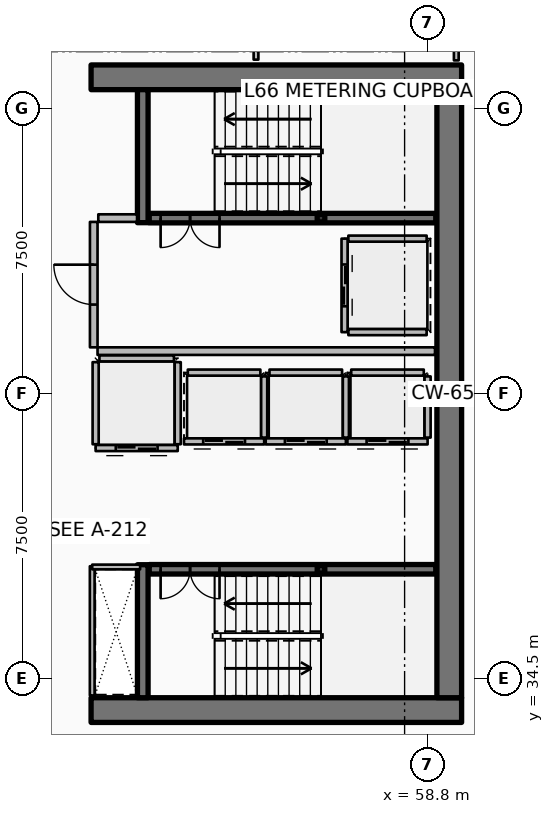
"""IFC4 building model, lengths in metres.
Left out: names, types, materials, properties, quantities, classifications, styles, units other than length and angle.
Written with IfcOpenShell. Run it as: python <this file> out.ifc"""

import sys

from ifc_helpers import new_model, si_unit, direction, frame, frame_2d, origin, origin_2d, place, context, subcontext, project, spatial, rectangle, hollow_rectangle, extrude, element, fill, save


model = new_model("IFC4")
c1 = context("Model", 3, precision=1e-05, world=origin(), true_north=direction((0.0, 1.0)))
c2 = subcontext(c1, "Body", "Model", "MODEL_VIEW")
j1 = project(units=[si_unit("LENGTHUNIT", "METRE"), si_unit("PLANEANGLEUNIT", "RADIAN")], contexts=[c1])
p1 = place(None, origin())
s1 = spatial("IfcSite", under=j1, at=p1, CompositionType="ELEMENT")
p2 = place(p1, origin())
s2 = spatial("IfcBuilding", under=s1, at=p2, CompositionType="ELEMENT")
p3 = place(p2, frame((0.0, 0.0, 263.65)))
s3 = spatial("IfcBuildingStorey", under=s2, at=p3, CompositionType="ELEMENT", Elevation=263.65)
for number, where, z_axis, x_axis in (
    (1, (49.95, 33.675, 0.0), (0.0, 0.0, 1.0), (1.0, 0.0, 0.0)),
    (2, (49.95, 50.325, 0.0), (0.0, 0.0, 1.0), (1.0, 0.0, 0.0)),
):
    element("IfcWall", number, at=place(p3, frame(where, z_axis=z_axis, x_axis=x_axis)), inside=s3, PredefinedType="SHEAR", context=c2, shape_type="SweptSolid", body=[
        extrude(rectangle(XDim=9.75, YDim=0.65, at=frame_2d((4.875, 0.0))), origin(), (0.0, 0.0, 1.0), 3.85),
    ])
p4 = place(p3, frame((59.375, 34.0, 0.0), z_axis=(0.0, 0.0, 1.0), x_axis=(0.0, 1.0, 0.0)))
e3 = element("IfcWall", 3, at=p4, inside=s3, PredefinedType="SHEAR", context=c2, shape_type="SweptSolid", body=[
    extrude(rectangle(XDim=16.0, YDim=0.65, at=frame_2d((8.0, 0.0))), origin(), (0.0, 0.0, 1.0), 3.85),
])
for number, where, z_axis, x_axis in (
    (4, (51.31, 46.5, 0.0), (0.0, 0.0, 1.0), (0.0, 1.0, 0.0)),
    (5, (51.31, 34.0, 0.0), (0.0, 0.0, 1.0), (0.0, 1.0, 0.0)),
):
    element("IfcWall", number, at=place(p3, frame(where, z_axis=z_axis, x_axis=x_axis)), inside=s3, PredefinedType="SHEAR", context=c2, shape_type="SweptSolid", body=[
        extrude(rectangle(XDim=3.5, YDim=0.28, at=frame_2d((1.75, 0.0))), origin(), (0.0, 0.0, 1.0), 3.85),
    ])
for number, where, z_axis, x_axis in (
    (6, (56.0, 46.62, 0.0), (0.0, 0.0, 1.0), (1.0, 0.0, 0.0)),
    (7, (56.0, 37.38, 0.0), (0.0, 0.0, 1.0), (1.0, 0.0, 0.0)),
):
    element("IfcColumn", number, at=place(p3, frame(where, z_axis=z_axis, x_axis=x_axis)), inside=s3, PredefinedType="COLUMN", context=c2, shape_type="SweptSolid", body=[
        extrude(hollow_rectangle(XDim=0.2, YDim=0.2, WallThickness=0.01, InnerFilletRadius=0.01, OuterFilletRadius=0.02, at=origin_2d()), origin(), (0.0, 0.0, 1.0), 1.72),
    ])
p5 = place(p3, frame((51.48, 46.62, 0.0), z_axis=(0.0, 0.0, 1.0), x_axis=(1.0, 0.0, 0.0)))
e8 = element("IfcWall", 8, at=p5, inside=s3, PredefinedType="SOLIDWALL", context=c2, shape_type="SweptSolid", body=[
    extrude(rectangle(XDim=7.54, YDim=0.25, at=frame_2d((3.77, 0.0))), origin(), (0.0, 0.0, 1.0), 3.59),
])
p6 = place(p5, frame((0.3, 0.0, 0.0)))
e9 = element("IfcOpeningElement", 9, at=p6, cuts=e8, PredefinedType="OPENING", context=c2, shape_type="SweptSolid", body=[
    extrude(rectangle(XDim=1.55, YDim=2.15, at=frame_2d((0.775, 1.075))), frame((0.0, 0.135, 0.0), z_axis=(0.0, -1.0, 0.0), x_axis=(1.0, 0.0, 0.0)), (0.0, 0.0, 1.0), 0.27),
])
p7 = place(p3, frame((51.48, 37.38, 0.0), z_axis=(0.0, 0.0, 1.0), x_axis=(1.0, 0.0, 0.0)))
e10 = element("IfcWall", 10, at=p7, inside=s3, PredefinedType="SOLIDWALL", context=c2, shape_type="SweptSolid", body=[
    extrude(rectangle(XDim=7.54, YDim=0.25, at=frame_2d((3.77, 0.0))), origin(), (0.0, 0.0, 1.0), 3.59),
])
p8 = place(p7, frame((0.3, 0.0, 0.0)))
e11 = element("IfcOpeningElement", 11, at=p8, cuts=e10, PredefinedType="OPENING", context=c2, shape_type="SweptSolid", body=[
    extrude(rectangle(XDim=1.55, YDim=2.15, at=frame_2d((0.775, 1.075))), frame((0.0, 0.135, 0.0), z_axis=(0.0, -1.0, 0.0), x_axis=(1.0, 0.0, 0.0)), (0.0, 0.0, 1.0), 0.27),
])
p9 = place(p3, frame((54.505, 40.745, 0.0), z_axis=(0.0, 0.0, 1.0), x_axis=(-1.0, 0.0, 0.0)))
e12 = element("IfcWall", 12, at=p9, inside=s3, PredefinedType="PARTITIONING", context=c2, shape_type="SweptSolid", body=[
    extrude(rectangle(XDim=2.11, YDim=0.16, at=frame_2d((1.055, 0.0))), origin(), (0.0, 0.0, 1.0), 3.59),
])
p10 = place(p9, frame((0.505, 0.0, 0.0)))
e13 = element("IfcOpeningElement", 13, at=p10, cuts=e12, PredefinedType="OPENING", context=c2, shape_type="SweptSolid", body=[
    extrude(rectangle(XDim=1.1, YDim=2.1, at=frame_2d((0.55, 1.05))), frame((0.0, 0.09, 0.0), z_axis=(0.0, -1.0, 0.0), x_axis=(1.0, 0.0, 0.0)), (0.0, 0.0, 1.0), 0.18),
])
p11 = place(p3, frame((54.505, 40.845, 0.0), z_axis=(0.0, 0.0, 1.0), x_axis=(0.0, 1.0, 0.0)))
e14 = element("IfcWall", 14, at=p11, inside=s3, PredefinedType="PARTITIONING", context=c2, shape_type="SweptSolid", body=[
    extrude(rectangle(XDim=1.61, YDim=0.16, at=frame_2d((0.805, 0.0))), origin(), (0.0, 0.0, 1.0), 3.59),
])
p12 = place(p3, frame((52.495, 42.555, 0.0), z_axis=(0.0, 0.0, 1.0), x_axis=(1.0, 0.0, 0.0)))
e15 = element("IfcWall", 15, at=p12, inside=s3, PredefinedType="PARTITIONING", context=c2, shape_type="SweptSolid", body=[
    extrude(rectangle(XDim=1.91, YDim=0.16, at=frame_2d((0.955, 0.0))), origin(), (0.0, 0.0, 1.0), 3.59),
])
p13 = place(p3, frame((56.655, 40.745, 0.0), z_axis=(0.0, 0.0, 1.0), x_axis=(-1.0, 0.0, 0.0)))
e16 = element("IfcWall", 16, at=p13, inside=s3, PredefinedType="PARTITIONING", context=c2, shape_type="SweptSolid", body=[
    extrude(rectangle(XDim=2.11, YDim=0.16, at=frame_2d((1.055, 0.0))), origin(), (0.0, 0.0, 1.0), 3.59),
])
p14 = place(p13, frame((0.505, 0.0, 0.0)))
e17 = element("IfcOpeningElement", 17, at=p14, cuts=e16, PredefinedType="OPENING", context=c2, shape_type="SweptSolid", body=[
    extrude(rectangle(XDim=1.1, YDim=2.1, at=frame_2d((0.55, 1.05))), frame((0.0, 0.09, 0.0), z_axis=(0.0, -1.0, 0.0), x_axis=(1.0, 0.0, 0.0)), (0.0, 0.0, 1.0), 0.18),
])
p15 = place(p3, frame((56.655, 40.845, 0.0), z_axis=(0.0, 0.0, 1.0), x_axis=(0.0, 1.0, 0.0)))
e18 = element("IfcWall", 18, at=p15, inside=s3, PredefinedType="PARTITIONING", context=c2, shape_type="SweptSolid", body=[
    extrude(rectangle(XDim=1.61, YDim=0.16, at=frame_2d((0.805, 0.0))), origin(), (0.0, 0.0, 1.0), 3.59),
])
p16 = place(p3, frame((54.645, 42.555, 0.0), z_axis=(0.0, 0.0, 1.0), x_axis=(1.0, 0.0, 0.0)))
e19 = element("IfcWall", 19, at=p16, inside=s3, PredefinedType="PARTITIONING", context=c2, shape_type="SweptSolid", body=[
    extrude(rectangle(XDim=1.91, YDim=0.16, at=frame_2d((0.955, 0.0))), origin(), (0.0, 0.0, 1.0), 3.59),
])
p17 = place(p3, frame((58.805, 40.745, 0.0), z_axis=(0.0, 0.0, 1.0), x_axis=(-1.0, 0.0, 0.0)))
e20 = element("IfcWall", 20, at=p17, inside=s3, PredefinedType="PARTITIONING", context=c2, shape_type="SweptSolid", body=[
    extrude(rectangle(XDim=2.11, YDim=0.16, at=frame_2d((1.055, 0.0))), origin(), (0.0, 0.0, 1.0), 3.59),
])
p18 = place(p17, frame((0.505, 0.0, 0.0)))
e21 = element("IfcOpeningElement", 21, at=p18, cuts=e20, PredefinedType="OPENING", context=c2, shape_type="SweptSolid", body=[
    extrude(rectangle(XDim=1.1, YDim=2.1, at=frame_2d((0.55, 1.05))), frame((0.0, 0.09, 0.0), z_axis=(0.0, -1.0, 0.0), x_axis=(1.0, 0.0, 0.0)), (0.0, 0.0, 1.0), 0.18),
])
p19 = place(p3, frame((58.805, 40.845, 0.0), z_axis=(0.0, 0.0, 1.0), x_axis=(0.0, 1.0, 0.0)))
e22 = element("IfcWall", 22, at=p19, inside=s3, PredefinedType="PARTITIONING", context=c2, shape_type="SweptSolid", body=[
    extrude(rectangle(XDim=1.61, YDim=0.16, at=frame_2d((0.805, 0.0))), origin(), (0.0, 0.0, 1.0), 3.59),
])
p20 = place(p3, frame((56.795, 42.555, 0.0), z_axis=(0.0, 0.0, 1.0), x_axis=(1.0, 0.0, 0.0)))
e23 = element("IfcWall", 23, at=p20, inside=s3, PredefinedType="PARTITIONING", context=c2, shape_type="SweptSolid", body=[
    extrude(rectangle(XDim=1.91, YDim=0.16, at=frame_2d((0.955, 0.0))), origin(), (0.0, 0.0, 1.0), 3.59),
])
p21 = place(p3, frame((56.62, 46.08, 0.0), z_axis=(0.0, 0.0, 1.0), x_axis=(0.0, -1.0, 0.0)))
e24 = element("IfcWall", 24, at=p21, inside=s3, PredefinedType="PARTITIONING", context=c2, shape_type="SweptSolid", body=[
    extrude(rectangle(XDim=2.46, YDim=0.16, at=frame_2d((1.23, 0.0))), origin(), (0.0, 0.0, 1.0), 3.59),
])
p22 = place(p21, frame((0.68, 0.0, 0.0)))
e25 = element("IfcOpeningElement", 25, at=p22, cuts=e24, PredefinedType="OPENING", context=c2, shape_type="SweptSolid", body=[
    extrude(rectangle(XDim=1.1, YDim=2.1, at=frame_2d((0.55, 1.05))), frame((0.0, 0.09, 0.0), z_axis=(0.0, -1.0, 0.0), x_axis=(1.0, 0.0, 0.0)), (0.0, 0.0, 1.0), 0.18),
])
for number, where, z_axis, x_axis in (
    (26, (56.72, 46.08, 0.0), (0.0, 0.0, 1.0), (1.0, 0.0, 0.0)),
    (27, (56.72, 43.62, 0.0), (0.0, 0.0, 1.0), (1.0, 0.0, 0.0)),
):
    element("IfcWall", number, at=place(p3, frame(where, z_axis=z_axis, x_axis=x_axis)), inside=s3, PredefinedType="PARTITIONING", context=c2, shape_type="SweptSolid", body=[
        extrude(rectangle(XDim=2.06, YDim=0.16, at=frame_2d((1.03, 0.0))), origin(), (0.0, 0.0, 1.0), 3.59),
    ])
p23 = place(p3, frame((52.23, 40.57, 0.0), z_axis=(0.0, 0.0, 1.0), x_axis=(-1.0, 0.0, 0.0)))
e28 = element("IfcWall", 28, at=p23, inside=s3, PredefinedType="PARTITIONING", context=c2, shape_type="SweptSolid", body=[
    extrude(rectangle(XDim=2.16, YDim=0.16, at=frame_2d((1.08, 0.0))), origin(), (0.0, 0.0, 1.0), 3.59),
])
p24 = place(p23, frame((0.53, 0.0, 0.0)))
e29 = element("IfcOpeningElement", 29, at=p24, cuts=e28, PredefinedType="OPENING", context=c2, shape_type="SweptSolid", body=[
    extrude(rectangle(XDim=1.1, YDim=2.1, at=frame_2d((0.55, 1.05))), frame((0.0, 0.09, 0.0), z_axis=(0.0, -1.0, 0.0), x_axis=(1.0, 0.0, 0.0)), (0.0, 0.0, 1.0), 0.18),
])
for number, where, z_axis, x_axis in (
    (30, (52.23, 40.67, 0.0), (0.0, 0.0, 1.0), (0.0, 1.0, 0.0)),
    (31, (50.07, 40.67, 0.0), (0.0, 0.0, 1.0), (0.0, 1.0, 0.0)),
):
    element("IfcWall", number, at=place(p3, frame(where, z_axis=z_axis, x_axis=x_axis)), inside=s3, PredefinedType="PARTITIONING", context=c2, shape_type="SweptSolid", body=[
        extrude(rectangle(XDim=2.16, YDim=0.16, at=frame_2d((1.08, 0.0))), origin(), (0.0, 0.0, 1.0), 3.59),
    ])
p25 = place(p3, frame((50.17, 42.93, 0.0), z_axis=(0.0, 0.0, 1.0), x_axis=(1.0, 0.0, 0.0)))
e32 = element("IfcWall", 32, at=p25, inside=s3, PredefinedType="PARTITIONING", context=c2, shape_type="SweptSolid", body=[
    extrude(rectangle(XDim=1.96, YDim=0.16, at=frame_2d((0.98, 0.0))), origin(), (0.0, 0.0, 1.0), 3.59),
])
p26 = place(p3, frame((50.12, 43.12, 0.0), z_axis=(0.0, 0.0, 1.0), x_axis=(1.0, 0.0, 0.0)))
e33 = element("IfcWall", 33, at=p26, inside=s3, PredefinedType="PARTITIONING", context=c2, shape_type="SweptSolid", body=[
    extrude(rectangle(XDim=8.88, YDim=0.2, at=frame_2d((4.44, 0.0))), origin(), (0.0, 0.0, 1.0), 3.59),
])
p27 = place(p3, frame((50.14, 46.62, 0.0), z_axis=(0.0, 0.0, 1.0), x_axis=(1.0, 0.0, 0.0)))
e34 = element("IfcWall", 34, at=p27, inside=s3, PredefinedType="PARTITIONING", context=c2, shape_type="SweptSolid", body=[
    extrude(rectangle(XDim=1.02, YDim=0.2, at=frame_2d((0.51, 0.0))), origin(), (0.0, 0.0, 1.0), 3.59),
])
p28 = place(p3, frame((50.02, 43.22, 0.0), z_axis=(0.0, 0.0, 1.0), x_axis=(0.0, 1.0, 0.0)))
e35 = element("IfcWall", 35, at=p28, inside=s3, PredefinedType="PARTITIONING", context=c2, shape_type="SweptSolid", body=[
    extrude(rectangle(XDim=3.3, YDim=0.2, at=frame_2d((1.65, 0.0))), origin(), (0.0, 0.0, 1.0), 3.59),
])
p29 = place(p28, frame((1.125, 0.0, 0.0)))
e36 = element("IfcOpeningElement", 36, at=p29, cuts=e35, PredefinedType="OPENING", context=c2, shape_type="SweptSolid", body=[
    extrude(rectangle(XDim=1.05, YDim=2.1, at=frame_2d((0.525, 1.05))), frame((0.0, 0.11, 0.0), z_axis=(0.0, -1.0, 0.0), x_axis=(1.0, 0.0, 0.0)), (0.0, 0.0, 1.0), 0.22),
])
p30 = place(p3, frame((49.98, 34.06, 0.0), z_axis=(0.0, 0.0, 1.0), x_axis=(0.0, 1.0, 0.0)))
e37 = element("IfcWall", 37, at=p30, inside=s3, PredefinedType="PARTITIONING", context=c2, shape_type="SweptSolid", body=[
    extrude(rectangle(XDim=3.4, YDim=0.125, at=frame_2d((1.7, 0.0))), origin(), (0.0, 0.0, 1.0), 3.03),
])
p31 = place(p3, frame((49.98, 37.44, 0.0), z_axis=(0.0, 0.0, 1.0), x_axis=(1.0, 0.0, 0.0)))
e38 = element("IfcWall", 38, at=p31, inside=s3, PredefinedType="PARTITIONING", context=c2, shape_type="SweptSolid", body=[
    extrude(rectangle(XDim=1.26, YDim=0.125, at=frame_2d((0.63, 0.0))), origin(), (0.0, 0.0, 1.0), 3.03),
])
p32 = place(p3, frame((59.56, 50.77, 0.0), z_axis=(0.0, 0.0, 1.0), x_axis=(0.0, 1.0, 0.0)))
e39 = element("IfcWall", 39, at=p32, inside=s3, PredefinedType="PARTITIONING", context=c2, shape_type="SweptSolid", body=[
    extrude(rectangle(XDim=1.54, YDim=0.125, at=frame_2d((0.77, 0.0))), origin(), (0.0, 0.0, 1.0), 3.03),
])
p33 = place(p3, frame((54.29, 50.79, 0.0), z_axis=(0.0, 0.0, 1.0), x_axis=(0.0, 1.0, 0.0)))
e40 = element("IfcWall", 40, at=p33, inside=s3, PredefinedType="PARTITIONING", context=c2, shape_type="SweptSolid", body=[
    extrude(rectangle(XDim=1.52, YDim=0.125, at=frame_2d((0.76, 0.0))), origin(), (0.0, 0.0, 1.0), 3.03),
])
p34 = place(p33, frame((0.335, 0.0, 0.0)))
e41 = element("IfcOpeningElement", 41, at=p34, cuts=e40, PredefinedType="OPENING", context=c2, shape_type="SweptSolid", body=[
    extrude(rectangle(XDim=0.85, YDim=2.06, at=frame_2d((0.425, 1.03))), frame((0.0, 0.073, 0.0), z_axis=(0.0, -1.0, 0.0), x_axis=(1.0, 0.0, 0.0)), (0.0, 0.0, 1.0), 0.145),
])
p35 = place(p6, origin())
e42 = element("IfcDoor", 42, at=p35, inside=s3, OperationType="DOUBLE_DOOR_SINGLE_SWING", PredefinedType="DOOR", context=c2, shape_type="SweptSolid", body=[
    extrude(rectangle(XDim=1.55, YDim=2.15, at=frame_2d((0.775, 1.075))), frame((0.0, 0.025, 0.0), z_axis=(0.0, -1.0, 0.0), x_axis=(1.0, 0.0, 0.0)), (0.0, 0.0, 1.0), 0.05),
])
fill(e9, e42)
p36 = place(p8, origin())
e43 = element("IfcDoor", 43, at=p36, inside=s3, OperationType="DOUBLE_DOOR_SINGLE_SWING", PredefinedType="DOOR", context=c2, shape_type="SweptSolid", body=[
    extrude(rectangle(XDim=1.55, YDim=2.15, at=frame_2d((0.775, 1.075))), frame((0.0, 0.025, 0.0), z_axis=(0.0, -1.0, 0.0), x_axis=(1.0, 0.0, 0.0)), (0.0, 0.0, 1.0), 0.05),
])
fill(e11, e43)
p37 = place(p10, origin())
e44 = element("IfcDoor", 44, at=p37, inside=s3, OperationType="DOUBLE_DOOR_SLIDING", PredefinedType="DOOR", context=c2, shape_type="SweptSolid", body=[
    extrude(rectangle(XDim=1.1, YDim=2.1, at=frame_2d((0.55, 1.05))), frame((0.0, 0.025, 0.0), z_axis=(0.0, -1.0, 0.0), x_axis=(1.0, 0.0, 0.0)), (0.0, 0.0, 1.0), 0.05),
])
fill(e13, e44)
p38 = place(p14, origin())
e45 = element("IfcDoor", 45, at=p38, inside=s3, OperationType="DOUBLE_DOOR_SLIDING", PredefinedType="DOOR", context=c2, shape_type="SweptSolid", body=[
    extrude(rectangle(XDim=1.1, YDim=2.1, at=frame_2d((0.55, 1.05))), frame((0.0, 0.025, 0.0), z_axis=(0.0, -1.0, 0.0), x_axis=(1.0, 0.0, 0.0)), (0.0, 0.0, 1.0), 0.05),
])
fill(e17, e45)
p39 = place(p18, origin())
e46 = element("IfcDoor", 46, at=p39, inside=s3, OperationType="DOUBLE_DOOR_SLIDING", PredefinedType="DOOR", context=c2, shape_type="SweptSolid", body=[
    extrude(rectangle(XDim=1.1, YDim=2.1, at=frame_2d((0.55, 1.05))), frame((0.0, 0.025, 0.0), z_axis=(0.0, -1.0, 0.0), x_axis=(1.0, 0.0, 0.0)), (0.0, 0.0, 1.0), 0.05),
])
fill(e21, e46)
p40 = place(p22, origin())
e47 = element("IfcDoor", 47, at=p40, inside=s3, OperationType="DOUBLE_DOOR_SLIDING", PredefinedType="DOOR", context=c2, shape_type="SweptSolid", body=[
    extrude(rectangle(XDim=1.1, YDim=2.1, at=frame_2d((0.55, 1.05))), frame((0.0, 0.025, 0.0), z_axis=(0.0, -1.0, 0.0), x_axis=(1.0, 0.0, 0.0)), (0.0, 0.0, 1.0), 0.05),
])
fill(e25, e47)
p41 = place(p24, origin())
e48 = element("IfcDoor", 48, at=p41, inside=s3, OperationType="DOUBLE_DOOR_SLIDING", PredefinedType="DOOR", context=c2, shape_type="SweptSolid", body=[
    extrude(rectangle(XDim=1.1, YDim=2.1, at=frame_2d((0.55, 1.05))), frame((0.0, 0.025, 0.0), z_axis=(0.0, -1.0, 0.0), x_axis=(1.0, 0.0, 0.0)), (0.0, 0.0, 1.0), 0.05),
])
fill(e29, e48)
p42 = place(p29, origin())
e49 = element("IfcDoor", 49, at=p42, inside=s3, OperationType="SINGLE_SWING_RIGHT", PredefinedType="DOOR", context=c2, shape_type="SweptSolid", body=[
    extrude(rectangle(XDim=1.05, YDim=2.1, at=frame_2d((0.525, 1.05))), frame((0.0, 0.025, 0.0), z_axis=(0.0, -1.0, 0.0), x_axis=(1.0, 0.0, 0.0)), (0.0, 0.0, 1.0), 0.05),
])
fill(e36, e49)
save(model, sys.argv[1])
